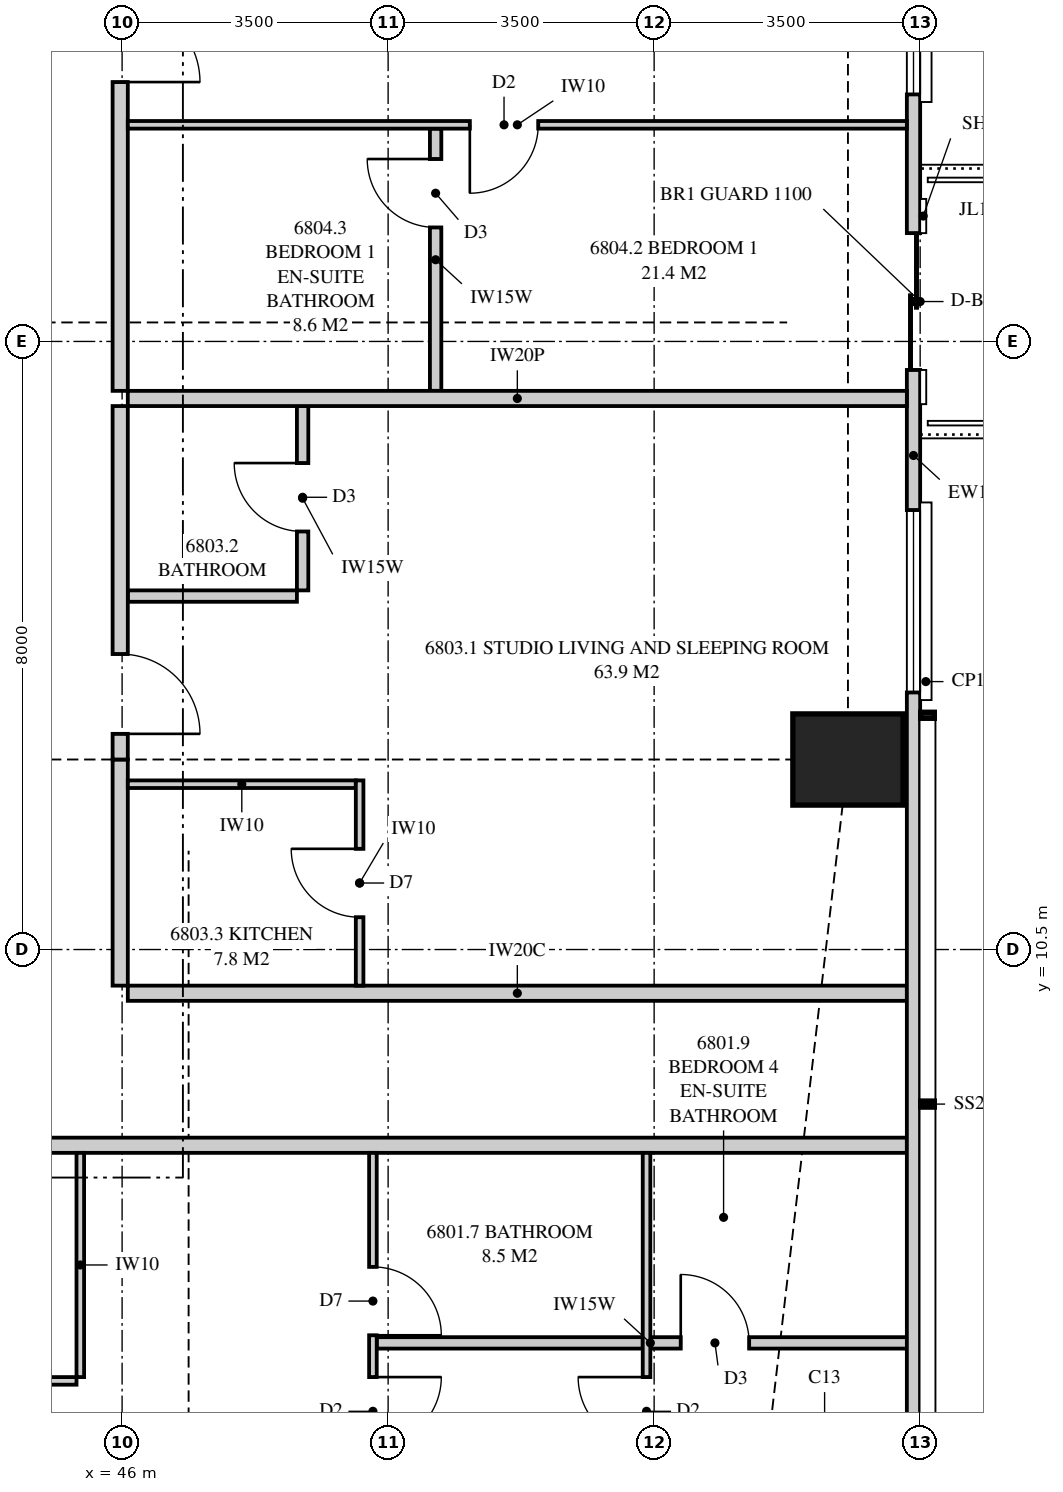
"""IFC4 building model, lengths in metres.
Left out: names, types, materials, properties, quantities, classifications, styles, units other than length and angle.
Written with IfcOpenShell. Run it as: python <this file> out.ifc"""

import sys

from ifc_helpers import new_model, si_unit, direction, frame, frame_2d, origin, origin_2d, place, context, subcontext, project, spatial, polyline, rectangle, outline, extrude, element, fill, save


model = new_model("IFC4")
c1 = context("Model", 3, precision=1e-05, world=origin(), true_north=direction((0.0, 1.0)))
c2 = subcontext(c1, "Body", "Model", "MODEL_VIEW")
j1 = project(units=[si_unit("LENGTHUNIT", "METRE"), si_unit("PLANEANGLEUNIT", "RADIAN")], contexts=[c1])
p1 = place(None, origin())
s1 = spatial("IfcSite", under=j1, at=p1, CompositionType="ELEMENT")
p2 = place(p1, origin())
s2 = spatial("IfcBuilding", under=s1, at=p2, CompositionType="ELEMENT")
p3 = place(p2, frame((0.0, 0.0, 249.45)))
s3 = spatial("IfcBuildingStorey", under=s2, at=p3, CompositionType="ELEMENT", Elevation=249.45)
p4 = place(p3, frame((55.55, 13.0, 0.0), z_axis=(0.0, 0.0, 1.0), x_axis=(1.0, 0.0, 0.0)))
e1 = element("IfcColumn", 1, at=p4, inside=s3, PredefinedType="COLUMN", context=c2, shape_type="SweptSolid", body=[
    extrude(rectangle(XDim=1.45, YDim=1.2, at=origin_2d()), origin(), (0.0, 0.0, 1.0), 3.5),
])
p5 = place(p3, frame((56.413, 3.051, 0.0), z_axis=(0.0, 0.0, 1.0), x_axis=(0.0, 1.0, 0.0)))
e2 = element("IfcWall", 2, at=p5, inside=s3, PredefinedType="SOLIDWALL", context=c2, shape_type="SweptSolid", body=[
    extrude(outline(polyline([(0.0, 0.0), (27.897, 0.0), (27.897, 3.26), (22.157, 3.26), (22.157, 2.3), (22.092, 2.3), (22.092, 3.26), (21.949, 3.26), (21.949, 2.3), (9.949, 2.3), (9.949, 3.26), (9.858, 3.26), (9.858, 2.3), (9.688, 2.3), (9.688, 3.26), (0.0, 3.26), (0.0, 0.0)])), frame((0.0, 0.087, 0.0), z_axis=(0.0, -1.0, 0.0), x_axis=(1.0, 0.0, 0.0)), (0.0, 0.0, 1.0), 0.175),
])
p6 = place(p5, frame((10.831, 0.0, 0.4)))
e3 = element("IfcOpeningElement", 3, at=p6, cuts=e2, PredefinedType="OPENING", context=c2, shape_type="SweptSolid", body=[
    extrude(rectangle(XDim=2.4, YDim=1.85, at=frame_2d((1.2, 0.925))), frame((0.0, 0.097, 0.0), z_axis=(0.0, -1.0, 0.0), x_axis=(1.0, 0.0, 0.0)), (0.0, 0.0, 1.0), 0.195),
])
p7 = place(p5, frame((15.074, 0.0, 0.0)))
e4 = element("IfcOpeningElement", 4, at=p7, cuts=e2, PredefinedType="OPENING", context=c2, shape_type="SweptSolid", body=[
    extrude(rectangle(XDim=1.8, YDim=2.25, at=frame_2d((0.9, 1.125))), frame((0.0, 0.097, 0.0), z_axis=(0.0, -1.0, 0.0), x_axis=(1.0, 0.0, 0.0)), (0.0, 0.0, 1.0), 0.195),
])
p8 = place(p5, frame((18.699, 0.0, 0.4)))
e5 = element("IfcOpeningElement", 5, at=p8, cuts=e2, PredefinedType="OPENING", context=c2, shape_type="SweptSolid", body=[
    extrude(rectangle(XDim=2.4, YDim=1.85, at=frame_2d((1.2, 0.925))), frame((0.0, 0.097, 0.0), z_axis=(0.0, -1.0, 0.0), x_axis=(1.0, 0.0, 0.0)), (0.0, 0.0, 1.0), 0.195),
])
p9 = place(p3, frame((46.075, 9.925, 0.0), z_axis=(0.0, 0.0, 1.0), x_axis=(1.0, 0.0, 0.0)))
e6 = element("IfcWall", 6, at=p9, inside=s3, PredefinedType="PARTITIONING", context=c2, shape_type="SweptSolid", body=[
    extrude(outline(polyline([(0.0, 0.0), (10.25, 0.0), (10.25, 3.26), (10.033, 3.26), (10.033, 2.3), (8.201, 2.3), (8.201, 3.26), (2.11, 3.26), (2.11, 2.66), (0.0, 2.66), (0.0, 3.26), (0.0, 0.0)])), frame((0.0, 0.1, 0.0), z_axis=(0.0, -1.0, 0.0), x_axis=(1.0, 0.0, 0.0)), (0.0, 0.0, 1.0), 0.2),
])
p10 = place(p3, frame((18.0, 7.925, 0.0), z_axis=(0.0, 0.0, 1.0), x_axis=(1.0, 0.0, 0.0)))
e7 = element("IfcWall", 7, at=p10, inside=s3, PredefinedType="PARTITIONING", context=c2, shape_type="SweptSolid", body=[
    extrude(outline(polyline([(0.0, 0.0), (38.325, 0.0), (38.325, 3.26), (37.875, 3.26), (37.875, 2.3), (36.043, 2.3), (36.043, 3.26), (30.185, 3.26), (30.185, 2.66), (27.565, 2.66), (27.565, 3.26), (20.56, 3.26), (20.56, 2.66), (17.94, 2.66), (17.94, 3.26), (10.935, 3.26), (10.935, 2.66), (8.315, 2.66), (8.315, 3.26), (1.839, 3.26), (1.839, 2.3), (0.0, 2.3), (0.0, 3.26), (0.0, 0.0)])), frame((0.0, 0.1, 0.0), z_axis=(0.0, -1.0, 0.0), x_axis=(1.0, 0.0, 0.0)), (0.0, 0.0, 1.0), 0.2),
])
p11 = place(p10, frame((18.75, 0.0, 0.0)))
e8 = element("IfcOpeningElement", 8, at=p11, cuts=e7, PredefinedType="OPENING", context=c2, shape_type="SweptSolid", body=[
    extrude(rectangle(XDim=1.05, YDim=2.2, at=frame_2d((0.525, 1.1))), frame((0.0, 0.11, 0.0), z_axis=(0.0, -1.0, 0.0), x_axis=(1.0, 0.0, 0.0)), (0.0, 0.0, 1.0), 0.22),
])
p12 = place(p3, frame((49.3, 0.175, 0.0), z_axis=(0.0, 0.0, 1.0), x_axis=(0.0, 1.0, 0.0)))
e9 = element("IfcWall", 9, at=p12, inside=s3, PredefinedType="PARTITIONING", context=c2, shape_type="SweptSolid", body=[
    extrude(outline(polyline([(0.0, 0.0), (7.65, 0.0), (7.65, 3.26), (2.058, 3.26), (2.058, 2.3), (0.314, 2.3), (0.314, 3.26), (0.0, 3.26), (0.0, 0.0)])), frame((0.0, 0.05, 0.0), z_axis=(0.0, -1.0, 0.0), x_axis=(1.0, 0.0, 0.0)), (0.0, 0.0, 1.0), 0.1),
])
p13 = place(p12, frame((3.8, 0.0, 0.0)))
e10 = element("IfcOpeningElement", 10, at=p13, cuts=e9, PredefinedType="OPENING", context=c2, shape_type="SweptSolid", body=[
    extrude(rectangle(XDim=0.9, YDim=2.1, at=frame_2d((0.45, 1.05))), frame((0.0, 0.06, 0.0), z_axis=(0.0, -1.0, 0.0), x_axis=(1.0, 0.0, 0.0)), (0.0, 0.0, 1.0), 0.12),
])
p14 = place(p12, frame((5.25, 0.0, 0.0)))
e11 = element("IfcOpeningElement", 11, at=p14, cuts=e9, PredefinedType="OPENING", context=c2, shape_type="SweptSolid", body=[
    extrude(rectangle(XDim=0.9, YDim=2.1, at=frame_2d((0.45, 1.05))), frame((0.0, 0.06, 0.0), z_axis=(0.0, -1.0, 0.0), x_axis=(1.0, 0.0, 0.0)), (0.0, 0.0, 1.0), 0.12),
])
p15 = place(p3, frame((52.9, 0.175, 0.0), z_axis=(0.0, 0.0, 1.0), x_axis=(0.0, 1.0, 0.0)))
e12 = element("IfcWall", 12, at=p15, inside=s3, PredefinedType="PARTITIONING", context=c2, shape_type="SweptSolid", body=[
    extrude(outline(polyline([(0.0, 0.0), (7.65, 0.0), (7.65, 3.26), (2.668, 3.26), (2.668, 2.3), (0.924, 2.3), (0.924, 3.26), (0.0, 3.26), (0.0, 0.0)])), frame((0.0, 0.05, 0.0), z_axis=(0.0, -1.0, 0.0), x_axis=(1.0, 0.0, 0.0)), (0.0, 0.0, 1.0), 0.1),
])
p16 = place(p15, frame((3.8, 0.0, 0.0)))
e13 = element("IfcOpeningElement", 13, at=p16, cuts=e12, PredefinedType="OPENING", context=c2, shape_type="SweptSolid", body=[
    extrude(rectangle(XDim=0.9, YDim=2.1, at=frame_2d((0.45, 1.05))), frame((0.0, 0.06, 0.0), z_axis=(0.0, -1.0, 0.0), x_axis=(1.0, 0.0, 0.0)), (0.0, 0.0, 1.0), 0.12),
])
p17 = place(p3, frame((49.35, 5.325, 0.0), z_axis=(0.0, 0.0, 1.0), x_axis=(1.0, 0.0, 0.0)))
e14 = element("IfcWall", 14, at=p17, inside=s3, PredefinedType="PLUMBINGWALL", context=c2, shape_type="SweptSolid", body=[
    extrude(rectangle(XDim=3.5, YDim=0.15, at=frame_2d((1.75, 0.0))), origin(), (0.0, 0.0, 1.0), 3.26),
])
p18 = place(p3, frame((52.95, 5.325, 0.0), z_axis=(0.0, 0.0, 1.0), x_axis=(1.0, 0.0, 0.0)))
e15 = element("IfcWall", 15, at=p18, inside=s3, PredefinedType="PLUMBINGWALL", context=c2, shape_type="SweptSolid", body=[
    extrude(outline(polyline([(0.0, 0.0), (3.55, 0.0), (3.55, 3.26), (2.597, 3.26), (2.597, 2.3), (0.815, 2.3), (0.815, 3.26), (0.0, 3.26), (0.0, 0.0)])), frame((0.0, 0.075, 0.0), z_axis=(0.0, -1.0, 0.0), x_axis=(1.0, 0.0, 0.0)), (0.0, 0.0, 1.0), 0.15),
])
p19 = place(p18, frame((0.4, 0.0, 0.0)))
e16 = element("IfcOpeningElement", 16, at=p19, cuts=e15, PredefinedType="OPENING", context=c2, shape_type="SweptSolid", body=[
    extrude(rectangle(XDim=0.9, YDim=2.1, at=frame_2d((0.45, 1.05))), frame((0.0, 0.085, 0.0), z_axis=(0.0, -1.0, 0.0), x_axis=(1.0, 0.0, 0.0)), (0.0, 0.0, 1.0), 0.17),
])
p20 = place(p3, frame((41.9, 4.825, 0.0), z_axis=(0.0, 0.0, 1.0), x_axis=(1.0, 0.0, 0.0)))
e17 = element("IfcWall", 17, at=p20, inside=s3, PredefinedType="PARTITIONING", context=c2, shape_type="SweptSolid", body=[
    extrude(rectangle(XDim=3.5, YDim=0.1, at=frame_2d((1.75, 0.0))), origin(), (0.0, 0.0, 1.0), 3.26),
])
p21 = place(p20, frame((1.3, 0.0, 0.0)))
e18 = element("IfcOpeningElement", 18, at=p21, cuts=e17, PredefinedType="OPENING", context=c2, shape_type="SweptSolid", body=[
    extrude(rectangle(XDim=0.9, YDim=2.1, at=frame_2d((0.45, 1.05))), frame((0.0, 0.06, 0.0), z_axis=(0.0, -1.0, 0.0), x_axis=(1.0, 0.0, 0.0)), (0.0, 0.0, 1.0), 0.12),
])
p22 = place(p3, frame((45.45, 4.875, 0.0), z_axis=(0.0, 0.0, 1.0), x_axis=(0.0, 1.0, 0.0)))
e19 = element("IfcWall", 19, at=p22, inside=s3, PredefinedType="PARTITIONING", context=c2, shape_type="SweptSolid", body=[
    extrude(rectangle(XDim=2.95, YDim=0.1, at=frame_2d((1.475, 0.0))), origin(), (0.0, 0.0, 1.0), 3.26),
])
p23 = place(p3, frame((56.325, 17.75, 0.0), z_axis=(0.0, 0.0, 1.0), x_axis=(-1.0, 0.0, 0.0)))
e20 = element("IfcWall", 20, at=p23, inside=s3, PredefinedType="PARTITIONING", context=c2, shape_type="SweptSolid", body=[
    extrude(outline(polyline([(0.0, 0.0), (10.25, 0.0), (10.25, 3.26), (10.25, 2.66), (1.685, 2.66), (1.685, 2.3), (0.0, 2.3), (0.0, 3.26), (0.0, 0.0)])), frame((0.0, 0.1, 0.0), z_axis=(0.0, -1.0, 0.0), x_axis=(1.0, 0.0, 0.0)), (0.0, 0.0, 1.0), 0.2),
])
p24 = place(p3, frame((45.975, 10.025, 0.0), z_axis=(0.0, 0.0, 1.0), x_axis=(0.0, 1.0, 0.0)))
e21 = element("IfcWall", 21, at=p24, inside=s3, PredefinedType="PARTITIONING", context=c2, shape_type="SweptSolid", body=[
    extrude(rectangle(XDim=2.975, YDim=0.2, at=frame_2d((1.488, 0.0))), origin(), (0.0, 0.0, 1.0), 2.66),
])
p25 = place(p3, frame((45.975, 13.0, 0.0), z_axis=(0.0, 0.0, 1.0), x_axis=(0.0, 1.0, 0.0)))
e22 = element("IfcWall", 22, at=p25, inside=s3, PredefinedType="PARTITIONING", context=c2, shape_type="SweptSolid", body=[
    extrude(outline(polyline([(0.0, 0.0), (4.65, 0.0), (4.65, 2.66), (4.44, 2.66), (4.44, 3.26), (1.31, 3.26), (1.31, 2.66), (0.0, 2.66), (0.0, 0.0)])), frame((0.0, 0.1, 0.0), z_axis=(0.0, -1.0, 0.0), x_axis=(1.0, 0.0, 0.0)), (0.0, 0.0, 1.0), 0.2),
])
p26 = place(p25, frame((0.337, 0.0, 0.0)))
e23 = element("IfcOpeningElement", 23, at=p26, cuts=e22, PredefinedType="OPENING", context=c2, shape_type="SweptSolid", body=[
    extrude(rectangle(XDim=1.05, YDim=2.2, at=frame_2d((0.525, 1.1))), frame((0.0, 0.11, 0.0), z_axis=(0.0, -1.0, 0.0), x_axis=(1.0, 0.0, 0.0)), (0.0, 0.0, 1.0), 0.22),
])
p27 = place(p3, frame((48.375, 15.225, 0.0), z_axis=(0.0, 0.0, 1.0), x_axis=(0.0, 1.0, 0.0)))
e24 = element("IfcWall", 24, at=p27, inside=s3, PredefinedType="PLUMBINGWALL", context=c2, shape_type="SweptSolid", body=[
    extrude(outline(polyline([(0.0, 0.0), (2.425, 0.0), (2.425, 3.26), (2.425, 2.66), (2.24, 2.66), (2.24, 3.26), (0.0, 3.26), (0.0, 0.0)])), frame((0.0, 0.075, 0.0), z_axis=(0.0, -1.0, 0.0), x_axis=(1.0, 0.0, 0.0)), (0.0, 0.0, 1.0), 0.15),
])
p28 = place(p27, frame((0.775, 0.0, 0.0)))
e25 = element("IfcOpeningElement", 25, at=p28, cuts=e24, PredefinedType="OPENING", context=c2, shape_type="SweptSolid", body=[
    extrude(rectangle(XDim=0.9, YDim=2.1, at=frame_2d((0.45, 1.05))), frame((0.0, 0.085, 0.0), z_axis=(0.0, -1.0, 0.0), x_axis=(1.0, 0.0, 0.0)), (0.0, 0.0, 1.0), 0.17),
])
p29 = place(p3, frame((48.3, 15.15, 0.0), z_axis=(0.0, 0.0, 1.0), x_axis=(-1.0, 0.0, 0.0)))
e26 = element("IfcWall", 26, at=p29, inside=s3, PredefinedType="PLUMBINGWALL", context=c2, shape_type="SweptSolid", body=[
    extrude(rectangle(XDim=2.225, YDim=0.15, at=frame_2d((1.113, 0.0))), origin(), (0.0, 0.0, 1.0), 3.26),
])
p30 = place(p3, frame((45.975, 17.85, 0.0), z_axis=(0.0, 0.0, 1.0), x_axis=(0.0, 1.0, 0.0)))
e27 = element("IfcWall", 27, at=p30, inside=s3, PredefinedType="PARTITIONING", context=c2, shape_type="SweptSolid", body=[
    extrude(outline(polyline([(0.0, 0.0), (7.15, 0.0), (7.15, 2.66), (5.84, 2.66), (5.84, 3.26), (2.21, 3.26), (2.21, 2.66), (0.0, 2.66), (0.0, 0.0)])), frame((0.0, 0.1, 0.0), z_axis=(0.0, -1.0, 0.0), x_axis=(1.0, 0.0, 0.0)), (0.0, 0.0, 1.0), 0.2),
])
p31 = place(p30, frame((4.062, 0.0, 0.0)))
e28 = element("IfcOpeningElement", 28, at=p31, cuts=e27, PredefinedType="OPENING", context=c2, shape_type="SweptSolid", body=[
    extrude(rectangle(XDim=1.05, YDim=2.2, at=frame_2d((0.525, 1.1))), frame((0.0, 0.11, 0.0), z_axis=(0.0, -1.0, 0.0), x_axis=(1.0, 0.0, 0.0)), (0.0, 0.0, 1.0), 0.22),
])
p32 = place(p3, frame((56.325, 21.35, 0.0), z_axis=(0.0, 0.0, 1.0), x_axis=(-1.0, 0.0, 0.0)))
e29 = element("IfcWall", 29, at=p32, inside=s3, PredefinedType="PARTITIONING", context=c2, shape_type="SweptSolid", body=[
    extrude(outline(polyline([(0.0, 0.0), (10.25, 0.0), (10.25, 3.26), (1.635, 3.26), (1.635, 2.3), (0.0, 2.3), (0.0, 3.26), (0.0, 0.0)])), frame((0.0, 0.05, 0.0), z_axis=(0.0, -1.0, 0.0), x_axis=(1.0, 0.0, 0.0)), (0.0, 0.0, 1.0), 0.1),
])
p33 = place(p32, frame((4.85, 0.0, 0.0)))
e30 = element("IfcOpeningElement", 30, at=p33, cuts=e29, PredefinedType="OPENING", context=c2, shape_type="SweptSolid", body=[
    extrude(rectangle(XDim=0.9, YDim=2.1, at=frame_2d((0.45, 1.05))), frame((0.0, 0.06, 0.0), z_axis=(0.0, -1.0, 0.0), x_axis=(1.0, 0.0, 0.0)), (0.0, 0.0, 1.0), 0.12),
])
p34 = place(p3, frame((50.125, 17.85, 0.0), z_axis=(0.0, 0.0, 1.0), x_axis=(0.0, 1.0, 0.0)))
e31 = element("IfcWall", 31, at=p34, inside=s3, PredefinedType="PLUMBINGWALL", context=c2, shape_type="SweptSolid", body=[
    extrude(outline(polyline([(0.0, 0.0), (3.45, 0.0), (3.45, 3.26), (2.185, 3.26), (2.185, 2.66), (0.0, 2.66), (0.0, 3.26), (0.0, 0.0)])), frame((0.0, 0.075, 0.0), z_axis=(0.0, -1.0, 0.0), x_axis=(1.0, 0.0, 0.0)), (0.0, 0.0, 1.0), 0.15),
])
p35 = place(p34, frame((2.15, 0.0, 0.0)))
e32 = element("IfcOpeningElement", 32, at=p35, cuts=e31, PredefinedType="OPENING", context=c2, shape_type="SweptSolid", body=[
    extrude(rectangle(XDim=0.9, YDim=2.1, at=frame_2d((0.45, 1.05))), frame((0.0, 0.085, 0.0), z_axis=(0.0, -1.0, 0.0), x_axis=(1.0, 0.0, 0.0)), (0.0, 0.0, 1.0), 0.17),
])
p36 = place(p3, frame((49.125, 10.025, 0.0), z_axis=(0.0, 0.0, 1.0), x_axis=(0.0, 1.0, 0.0)))
e33 = element("IfcWall", 33, at=p36, inside=s3, PredefinedType="PARTITIONING", context=c2, shape_type="SweptSolid", body=[
    extrude(outline(polyline([(0.0, 0.0), (2.7, 0.0), (2.7, 3.26), (2.7, 2.66), (1.715, 2.66), (1.715, 3.26), (0.0, 3.26), (0.0, 0.0)])), frame((0.0, 0.05, 0.0), z_axis=(0.0, -1.0, 0.0), x_axis=(1.0, 0.0, 0.0)), (0.0, 0.0, 1.0), 0.1),
])
p37 = place(p36, frame((0.9, 0.0, 0.0)))
e34 = element("IfcOpeningElement", 34, at=p37, cuts=e33, PredefinedType="OPENING", context=c2, shape_type="SweptSolid", body=[
    extrude(rectangle(XDim=0.9, YDim=2.1, at=frame_2d((0.45, 1.05))), frame((0.0, 0.06, 0.0), z_axis=(0.0, -1.0, 0.0), x_axis=(1.0, 0.0, 0.0)), (0.0, 0.0, 1.0), 0.12),
])
p38 = place(p3, frame((46.075, 12.675, 0.0), z_axis=(0.0, 0.0, 1.0), x_axis=(1.0, 0.0, 0.0)))
e35 = element("IfcWall", 35, at=p38, inside=s3, PredefinedType="PARTITIONING", context=c2, shape_type="SweptSolid", body=[
    extrude(outline(polyline([(0.0, 0.0), (3.0, 0.0), (3.0, 3.26), (3.0, 2.66), (2.06, 2.66), (0.0, 2.66), (0.0, 3.26), (0.0, 0.0)])), frame((0.0, 0.05, 0.0), z_axis=(0.0, -1.0, 0.0), x_axis=(1.0, 0.0, 0.0)), (0.0, 0.0, 1.0), 0.1),
])
p39 = place(p6, origin())
e36 = element("IfcWindow", 36, at=p39, inside=s3, PartitioningType="SINGLE_PANEL", PredefinedType="WINDOW", context=c2, shape_type="SweptSolid", body=[
    extrude(rectangle(XDim=2.4, YDim=1.85, at=frame_2d((1.2, 0.925))), frame((0.0, 0.03, 0.0), z_axis=(0.0, -1.0, 0.0), x_axis=(1.0, 0.0, 0.0)), (0.0, 0.0, 1.0), 0.06),
])
fill(e3, e36)
p40 = place(p7, origin())
e37 = element("IfcDoor", 37, at=p40, inside=s3, OperationType="SLIDING_TO_LEFT", PredefinedType="DOOR", context=c2, shape_type="SweptSolid", body=[
    extrude(rectangle(XDim=1.8, YDim=2.25, at=frame_2d((0.9, 1.125))), frame((0.0, 0.025, 0.0), z_axis=(0.0, -1.0, 0.0), x_axis=(1.0, 0.0, 0.0)), (0.0, 0.0, 1.0), 0.05),
])
fill(e4, e37)
p41 = place(p8, origin())
e38 = element("IfcWindow", 38, at=p41, inside=s3, PartitioningType="SINGLE_PANEL", PredefinedType="WINDOW", context=c2, shape_type="SweptSolid", body=[
    extrude(rectangle(XDim=2.4, YDim=1.85, at=frame_2d((1.2, 0.925))), frame((0.0, 0.03, 0.0), z_axis=(0.0, -1.0, 0.0), x_axis=(1.0, 0.0, 0.0)), (0.0, 0.0, 1.0), 0.06),
])
fill(e5, e38)
p42 = place(p13, frame((0.9, 0.0, 0.0), z_axis=(0.0, 0.0, 1.0), x_axis=(-1.0, 0.0, 0.0)))
e39 = element("IfcDoor", 39, at=p42, inside=s3, OperationType="SINGLE_SWING_LEFT", PredefinedType="DOOR", context=c2, shape_type="SweptSolid", body=[
    extrude(rectangle(XDim=0.9, YDim=2.1, at=frame_2d((0.45, 1.05))), frame((0.0, 0.025, 0.0), z_axis=(0.0, -1.0, 0.0), x_axis=(1.0, 0.0, 0.0)), (0.0, 0.0, 1.0), 0.05),
])
fill(e10, e39)
p43 = place(p14, frame((0.9, 0.0, 0.0), z_axis=(0.0, 0.0, 1.0), x_axis=(-1.0, 0.0, 0.0)))
e40 = element("IfcDoor", 40, at=p43, inside=s3, OperationType="SINGLE_SWING_RIGHT", PredefinedType="DOOR", context=c2, shape_type="SweptSolid", body=[
    extrude(rectangle(XDim=0.9, YDim=2.1, at=frame_2d((0.45, 1.05))), frame((0.0, 0.025, 0.0), z_axis=(0.0, -1.0, 0.0), x_axis=(1.0, 0.0, 0.0)), (0.0, 0.0, 1.0), 0.05),
])
fill(e11, e40)
p44 = place(p16, origin())
e41 = element("IfcDoor", 41, at=p44, inside=s3, OperationType="SINGLE_SWING_RIGHT", PredefinedType="DOOR", context=c2, shape_type="SweptSolid", body=[
    extrude(rectangle(XDim=0.9, YDim=2.1, at=frame_2d((0.45, 1.05))), frame((0.0, 0.025, 0.0), z_axis=(0.0, -1.0, 0.0), x_axis=(1.0, 0.0, 0.0)), (0.0, 0.0, 1.0), 0.05),
])
fill(e13, e41)
p45 = place(p19, origin())
e42 = element("IfcDoor", 42, at=p45, inside=s3, OperationType="SINGLE_SWING_LEFT", PredefinedType="DOOR", context=c2, shape_type="SweptSolid", body=[
    extrude(rectangle(XDim=0.9, YDim=2.1, at=frame_2d((0.45, 1.05))), frame((0.0, 0.025, 0.0), z_axis=(0.0, -1.0, 0.0), x_axis=(1.0, 0.0, 0.0)), (0.0, 0.0, 1.0), 0.05),
])
fill(e16, e42)
p46 = place(p26, frame((1.05, 0.0, 0.0), z_axis=(0.0, 0.0, 1.0), x_axis=(-1.0, 0.0, 0.0)))
e43 = element("IfcDoor", 43, at=p46, inside=s3, OperationType="SINGLE_SWING_RIGHT", PredefinedType="DOOR", context=c2, shape_type="SweptSolid", body=[
    extrude(rectangle(XDim=1.05, YDim=2.2, at=frame_2d((0.525, 1.1))), frame((0.0, 0.025, 0.0), z_axis=(0.0, -1.0, 0.0), x_axis=(1.0, 0.0, 0.0)), (0.0, 0.0, 1.0), 0.05),
])
fill(e23, e43)
p47 = place(p28, origin())
e44 = element("IfcDoor", 44, at=p47, inside=s3, OperationType="SINGLE_SWING_RIGHT", PredefinedType="DOOR", context=c2, shape_type="SweptSolid", body=[
    extrude(rectangle(XDim=0.9, YDim=2.1, at=frame_2d((0.45, 1.05))), frame((0.0, 0.025, 0.0), z_axis=(0.0, -1.0, 0.0), x_axis=(1.0, 0.0, 0.0)), (0.0, 0.0, 1.0), 0.05),
])
fill(e25, e44)
p48 = place(p31, frame((1.05, 0.0, 0.0), z_axis=(0.0, 0.0, 1.0), x_axis=(-1.0, 0.0, 0.0)))
e45 = element("IfcDoor", 45, at=p48, inside=s3, OperationType="SINGLE_SWING_RIGHT", PredefinedType="DOOR", context=c2, shape_type="SweptSolid", body=[
    extrude(rectangle(XDim=1.05, YDim=2.2, at=frame_2d((0.525, 1.1))), frame((0.0, 0.025, 0.0), z_axis=(0.0, -1.0, 0.0), x_axis=(1.0, 0.0, 0.0)), (0.0, 0.0, 1.0), 0.05),
])
fill(e28, e45)
p49 = place(p33, origin())
e46 = element("IfcDoor", 46, at=p49, inside=s3, OperationType="SINGLE_SWING_RIGHT", PredefinedType="DOOR", context=c2, shape_type="SweptSolid", body=[
    extrude(rectangle(XDim=0.9, YDim=2.1, at=frame_2d((0.45, 1.05))), frame((0.0, 0.025, 0.0), z_axis=(0.0, -1.0, 0.0), x_axis=(1.0, 0.0, 0.0)), (0.0, 0.0, 1.0), 0.05),
])
fill(e30, e46)
p50 = place(p35, origin())
e47 = element("IfcDoor", 47, at=p50, inside=s3, OperationType="SINGLE_SWING_RIGHT", PredefinedType="DOOR", context=c2, shape_type="SweptSolid", body=[
    extrude(rectangle(XDim=0.9, YDim=2.1, at=frame_2d((0.45, 1.05))), frame((0.0, 0.025, 0.0), z_axis=(0.0, -1.0, 0.0), x_axis=(1.0, 0.0, 0.0)), (0.0, 0.0, 1.0), 0.05),
])
fill(e32, e47)
p51 = place(p37, origin())
e48 = element("IfcDoor", 48, at=p51, inside=s3, OperationType="SINGLE_SWING_RIGHT", PredefinedType="DOOR", context=c2, shape_type="SweptSolid", body=[
    extrude(rectangle(XDim=0.9, YDim=2.1, at=frame_2d((0.45, 1.05))), frame((0.0, 0.025, 0.0), z_axis=(0.0, -1.0, 0.0), x_axis=(1.0, 0.0, 0.0)), (0.0, 0.0, 1.0), 0.05),
])
fill(e34, e48)
save(model, sys.argv[1])
